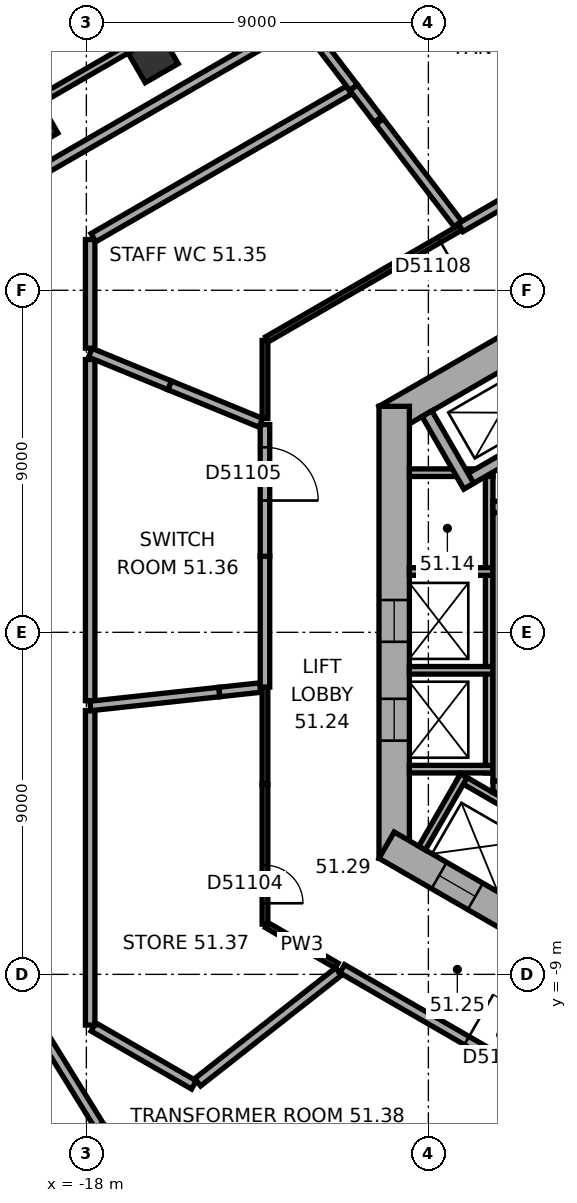
"""IFC4 building model, lengths in metres.
Left out: names, types, materials, properties, quantities, classifications, styles, units other than length and angle.
Written with IfcOpenShell. Run it as: python <this file> out.ifc"""

import sys

from ifc_helpers import new_model, si_unit, direction, frame, frame_2d, origin, origin_2d, place, context, subcontext, project, spatial, rectangle, extrude, element, fill, save


model = new_model("IFC4")
c1 = context("Model", 3, precision=1e-05, world=origin(), true_north=direction((0.0, 1.0)))
c2 = subcontext(c1, "Body", "Model", "MODEL_VIEW")
j1 = project(units=[si_unit("LENGTHUNIT", "METRE"), si_unit("PLANEANGLEUNIT", "RADIAN")], contexts=[c1])
p1 = place(None, origin())
s1 = spatial("IfcSite", under=j1, at=p1, CompositionType="ELEMENT")
p2 = place(p1, origin())
s2 = spatial("IfcBuilding", under=s1, at=p2, CompositionType="ELEMENT")
p3 = place(p2, frame((0.0, 0.0, 205.8)))
s3 = spatial("IfcBuildingStorey", under=s2, at=p3, CompositionType="ELEMENT", Elevation=205.8)
p4 = place(p3, frame((-16.242, 15.102, 0.0), z_axis=(0.0, 0.0, 1.0), x_axis=(-0.866025403784, -0.5, 0.0)))
e1 = element("IfcColumn", 1, at=p4, inside=s3, PredefinedType="COLUMN", context=c2, shape_type="SweptSolid", body=[
    extrude(rectangle(XDim=1.0, YDim=0.9, at=origin_2d()), origin(), (0.0, 0.0, 1.0), 4.8),
])
p5 = place(p3, frame((-19.494, 13.225, 0.0), z_axis=(0.0, 0.0, 1.0), x_axis=(-0.866025403784, -0.5, 0.0)))
e2 = element("IfcColumn", 2, at=p5, inside=s3, PredefinedType="COLUMN", context=c2, shape_type="SweptSolid", body=[
    extrude(rectangle(XDim=1.2, YDim=0.9, at=origin_2d()), origin(), (0.0, 0.0, 1.0), 4.8),
])
p6 = place(p3, frame((0.2, 11.547, 0.0), z_axis=(0.0, 0.0, 1.0), x_axis=(-0.866023897231, -0.500002609418, 0.0)))
e3 = element("IfcWall", 3, at=p6, inside=s3, PredefinedType="SHEAR", context=c2, shape_type="SweptSolid", body=[
    extrude(rectangle(XDim=11.894, YDim=0.8, at=frame_2d((5.947, 0.0))), origin(), (0.0, 0.0, 1.0), 4.8),
])
p7 = place(p6, frame((6.147, 0.0, 0.0)))
e4 = element("IfcOpeningElement", 4, at=p7, cuts=e3, PredefinedType="OPENING", context=c2, shape_type="SweptSolid", body=[
    extrude(rectangle(XDim=1.5, YDim=2.1, at=frame_2d((0.75, 1.05))), frame((0.0, 0.41, 0.0), z_axis=(0.0, -1.0, 0.0), x_axis=(1.0, 0.0, 0.0)), (0.0, 0.0, 1.0), 0.82),
])
p8 = place(p6, frame((1.697, 0.0, 0.0)))
e5 = element("IfcOpeningElement", 5, at=p8, cuts=e3, PredefinedType="OPENING", context=c2, shape_type="SweptSolid", body=[
    extrude(rectangle(XDim=0.9, YDim=2.1, at=frame_2d((0.45, 1.05))), frame((0.0, 0.41, 0.0), z_axis=(0.0, -1.0, 0.0), x_axis=(1.0, 0.0, 0.0)), (0.0, 0.0, 1.0), 0.82),
])
p9 = place(p6, frame((4.297, 0.0, 0.0)))
e6 = element("IfcOpeningElement", 6, at=p9, cuts=e3, PredefinedType="OPENING", context=c2, shape_type="SweptSolid", body=[
    extrude(rectangle(XDim=0.9, YDim=2.1, at=frame_2d((0.45, 1.05))), frame((0.0, 0.41, 0.0), z_axis=(0.0, -1.0, 0.0), x_axis=(1.0, 0.0, 0.0)), (0.0, 0.0, 1.0), 0.82),
])
p10 = place(p3, frame((-9.9, 5.947, 0.0), z_axis=(0.0, 0.0, 1.0), x_axis=(0.0, -1.0, 0.0)))
e7 = element("IfcWall", 7, at=p10, inside=s3, PredefinedType="SHEAR", context=c2, shape_type="SweptSolid", body=[
    extrude(rectangle(XDim=11.894, YDim=0.8, at=frame_2d((5.947, 0.0))), origin(), (0.0, 0.0, 1.0), 4.8),
])
p11 = place(p10, frame((5.097, 0.0, 0.0)))
e8 = element("IfcOpeningElement", 8, at=p11, cuts=e7, PredefinedType="OPENING", context=c2, shape_type="SweptSolid", body=[
    extrude(rectangle(XDim=1.1, YDim=2.1, at=frame_2d((0.55, 1.05))), frame((0.0, 0.41, 0.0), z_axis=(0.0, -1.0, 0.0), x_axis=(1.0, 0.0, 0.0)), (0.0, 0.0, 1.0), 0.82),
])
p12 = place(p10, frame((7.697, 0.0, 0.0)))
e9 = element("IfcOpeningElement", 9, at=p12, cuts=e7, PredefinedType="OPENING", context=c2, shape_type="SweptSolid", body=[
    extrude(rectangle(XDim=1.1, YDim=2.1, at=frame_2d((0.55, 1.05))), frame((0.0, 0.41, 0.0), z_axis=(0.0, -1.0, 0.0), x_axis=(1.0, 0.0, 0.0)), (0.0, 0.0, 1.0), 0.82),
])
p13 = place(p3, frame((-10.1, -5.6, 0.0), z_axis=(0.0, 0.0, 1.0), x_axis=(0.866023897231, -0.500002609418, 0.0)))
e10 = element("IfcWall", 10, at=p13, inside=s3, PredefinedType="SHEAR", context=c2, shape_type="SweptSolid", body=[
    extrude(rectangle(XDim=11.894, YDim=0.8, at=frame_2d((5.947, 0.0))), origin(), (0.0, 0.0, 1.0), 4.8),
])
p14 = place(p13, frame((6.147, 0.0, 0.0)))
e11 = element("IfcOpeningElement", 11, at=p14, cuts=e10, PredefinedType="OPENING", context=c2, shape_type="SweptSolid", body=[
    extrude(rectangle(XDim=1.5, YDim=2.1, at=frame_2d((0.75, 1.05))), frame((0.0, 0.41, 0.0), z_axis=(0.0, -1.0, 0.0), x_axis=(1.0, 0.0, 0.0)), (0.0, 0.0, 1.0), 0.82),
])
p15 = place(p13, frame((1.597, 0.0, 0.0)))
e12 = element("IfcOpeningElement", 12, at=p15, cuts=e10, PredefinedType="OPENING", context=c2, shape_type="SweptSolid", body=[
    extrude(rectangle(XDim=1.1, YDim=2.1, at=frame_2d((0.55, 1.05))), frame((0.0, 0.41, 0.0), z_axis=(0.0, -1.0, 0.0), x_axis=(1.0, 0.0, 0.0)), (0.0, 0.0, 1.0), 0.82),
])
p16 = place(p13, frame((4.197, 0.0, 0.0)))
e13 = element("IfcOpeningElement", 13, at=p16, cuts=e10, PredefinedType="OPENING", context=c2, shape_type="SweptSolid", body=[
    extrude(rectangle(XDim=1.1, YDim=2.1, at=frame_2d((0.55, 1.05))), frame((0.0, 0.41, 0.0), z_axis=(0.0, -1.0, 0.0), x_axis=(1.0, 0.0, 0.0)), (0.0, 0.0, 1.0), 0.82),
])
p17 = place(p3, frame((-2.961, 23.405, 0.0), z_axis=(0.0, 0.0, 1.0), x_axis=(-0.866023315909, -0.500003616288, 0.0)))
e14 = element("IfcWall", 14, at=p17, inside=s3, PredefinedType="STANDARD", context=c2, shape_type="SweptSolid", body=[
    extrude(rectangle(XDim=20.044, YDim=0.2, at=frame_2d((10.022, 0.0))), origin(), (0.0, 0.0, 1.0), 4.8),
])
p18 = place(p3, frame((-21.137, -10.496, 0.0), z_axis=(0.0, 0.0, 1.0), x_axis=(0.526178661629, -0.850374044786, 0.0)))
e15 = element("IfcWall", 15, at=p18, inside=s3, PredefinedType="STANDARD", context=c2, shape_type="SweptSolid", body=[
    extrude(rectangle(XDim=4.395, YDim=0.2, at=frame_2d((2.197, 0.0))), origin(), (0.0, 0.0, 1.0), 4.8),
])
p19 = place(p3, frame((-7.4, 4.3, 0.0), z_axis=(0.0, 0.0, 1.0), x_axis=(0.0, -1.0, 0.0)))
e16 = element("IfcWall", 16, at=p19, inside=s3, PredefinedType="PARTITIONING", context=c2, shape_type="SweptSolid", body=[
    extrude(rectangle(XDim=8.0, YDim=0.2, at=frame_2d((4.0, 0.0))), origin(), (0.0, 0.0, 1.0), 4.52),
])
for number, where, z_axis, x_axis in (
    (17, (-7.3, 4.2, 0.0), (0.0, 0.0, 1.0), (-1.0, 0.0, 0.0)),
    (18, (-7.3, 1.6, 0.0), (0.0, 0.0, 1.0), (-1.0, 0.0, 0.0)),
    (19, (-7.3, -1.0, 0.0), (0.0, 0.0, 1.0), (-1.0, 0.0, 0.0)),
    (20, (-7.3, -3.6, 0.0), (0.0, 0.0, 1.0), (-1.0, 0.0, 0.0)),
):
    element("IfcWall", number, at=place(p3, frame(where, z_axis=z_axis, x_axis=x_axis)), inside=s3, PredefinedType="PARTITIONING", context=c2, shape_type="SweptSolid", body=[
        extrude(rectangle(XDim=2.2, YDim=0.2, at=frame_2d((1.1, 0.0))), origin(), (0.0, 0.0, 1.0), 4.52),
    ])
p20 = place(p3, frame((-8.203, -3.809, 0.0), z_axis=(0.0, 0.0, 1.0), x_axis=(0.866028230842, -0.499995103361, 0.0)))
e21 = element("IfcWall", 21, at=p20, inside=s3, PredefinedType="PARTITIONING", context=c2, shape_type="SweptSolid", body=[
    extrude(rectangle(XDim=5.4, YDim=0.2, at=frame_2d((2.7, 0.0))), origin(), (0.0, 0.0, 1.0), 4.52),
])
p21 = place(p3, frame((-8.067, -3.772, 0.0), z_axis=(0.0, 0.0, 1.0), x_axis=(-0.50002983664, -0.866008176907, 0.0)))
e22 = element("IfcWall", 22, at=p21, inside=s3, PredefinedType="PARTITIONING", context=c2, shape_type="SweptSolid", body=[
    extrude(rectangle(XDim=2.2, YDim=0.2, at=frame_2d((1.1, 0.0))), origin(), (0.0, 0.0, 1.0), 4.52),
])
p22 = place(p3, frame((-2.6, 3.3, 0.0), z_axis=(0.0, 0.0, 1.0), x_axis=(-1.0, 0.0, 0.0)))
e23 = element("IfcWall", 23, at=p22, inside=s3, PredefinedType="SHEAR", context=c2, shape_type="SweptSolid", body=[
    extrude(rectangle(XDim=4.7, YDim=0.3, at=frame_2d((2.35, 0.0))), origin(), (0.0, 0.0, 1.0), 4.52),
])
p23 = place(p22, frame((0.8, 0.0, 0.0)))
e24 = element("IfcOpeningElement", 24, at=p23, cuts=e23, PredefinedType="OPENING", context=c2, shape_type="SweptSolid", body=[
    extrude(rectangle(XDim=1.2, YDim=2.1, at=frame_2d((0.6, 1.05))), frame((0.0, 0.16, 0.0), z_axis=(0.0, -1.0, 0.0), x_axis=(1.0, 0.0, 0.0)), (0.0, 0.0, 1.0), 0.32),
])
p24 = place(p3, frame((-2.6, -4.06, 0.0), z_axis=(0.0, 0.0, 1.0), x_axis=(-1.0, 0.0, 0.0)))
e25 = element("IfcWall", 25, at=p24, inside=s3, PredefinedType="SHEAR", context=c2, shape_type="SweptSolid", body=[
    extrude(rectangle(XDim=4.7, YDim=0.3, at=frame_2d((2.35, 0.0))), origin(), (0.0, 0.0, 1.0), 4.52),
])
p25 = place(p3, frame((-7.15, 3.15, 0.0), z_axis=(0.0, 0.0, 1.0), x_axis=(0.0, -1.0, 0.0)))
e26 = element("IfcWall", 26, at=p25, inside=s3, PredefinedType="SHEAR", context=c2, shape_type="SweptSolid", body=[
    extrude(rectangle(XDim=7.06, YDim=0.3, at=frame_2d((3.53, 0.0))), origin(), (0.0, 0.0, 1.0), 4.52),
])
p26 = place(p3, frame((-5.24, 5.577, 0.0), z_axis=(0.0, 0.0, 1.0), x_axis=(-0.866014461049, -0.500018952895, 0.0)))
e27 = element("IfcWall", 27, at=p26, inside=s3, PredefinedType="SHEAR", context=c2, shape_type="SweptSolid", body=[
    extrude(rectangle(XDim=3.35, YDim=0.3, at=frame_2d((1.675, 0.0))), origin(), (0.0, 0.0, 1.0), 4.52),
])
p27 = place(p3, frame((-7.937, 3.847, 0.0), z_axis=(0.0, 0.0, 1.0), x_axis=(-0.50002983664, 0.866008176907, 0.0)))
e28 = element("IfcWall", 28, at=p27, inside=s3, PredefinedType="SHEAR", context=c2, shape_type="SweptSolid", body=[
    extrude(rectangle(XDim=2.2, YDim=0.3, at=frame_2d((1.1, 0.0))), origin(), (0.0, 0.0, 1.0), 4.52),
])
p28 = place(p3, frame((-17.664, -12.982, 0.0), z_axis=(0.0, 0.0, 1.0), x_axis=(-0.526157085046, 0.850387395165, 0.0)))
e29 = element("IfcWall", 29, at=p28, inside=s3, PredefinedType="SOLIDWALL", context=c2, shape_type="SweptSolid", body=[
    extrude(rectangle(XDim=3.489, YDim=0.25, at=frame_2d((1.745, 0.0))), origin(), (0.0, 0.0, 1.0), 4.52),
])
p29 = place(p3, frame((-5.203, -12.514, 0.0), z_axis=(0.0, 0.0, 1.0), x_axis=(-0.383964269763, -0.923347951503, 0.0)))
e30 = element("IfcWall", 30, at=p29, inside=s3, PredefinedType="SOLIDWALL", context=c2, shape_type="SweptSolid", body=[
    extrude(rectangle(XDim=6.577, YDim=0.25, at=frame_2d((3.289, 0.0))), origin(), (0.0, 0.0, 1.0), 3.6),
])
p30 = place(p3, frame((-15.17, -11.908, 0.0), z_axis=(0.0, 0.0, 1.0), x_axis=(-0.866356035716, 0.499426890925, 0.0)))
e31 = element("IfcWall", 31, at=p30, inside=s3, PredefinedType="SOLIDWALL", context=c2, shape_type="SweptSolid", body=[
    extrude(rectangle(XDim=3.051, YDim=0.25, at=frame_2d((1.526, 0.0))), origin(), (0.0, 0.0, 1.0), 4.52),
])
p31 = place(p3, frame((-17.9, -10.334, 0.0), z_axis=(0.0, 0.0, 1.0), x_axis=(0.0, 1.0, 0.0)))
e32 = element("IfcWall", 32, at=p31, inside=s3, PredefinedType="SOLIDWALL", context=c2, shape_type="SweptSolid", body=[
    extrude(rectangle(XDim=8.276, YDim=0.25, at=frame_2d((4.138, 0.0))), origin(), (0.0, 0.0, 1.0), 4.52),
])
p32 = place(p3, frame((-11.363, -8.926, 0.0), z_axis=(0.0, 0.0, 1.0), x_axis=(-0.786388390319, -0.617732385075, 0.0)))
e33 = element("IfcWall", 33, at=p32, inside=s3, PredefinedType="SOLIDWALL", context=c2, shape_type="SweptSolid", body=[
    extrude(rectangle(XDim=4.716, YDim=0.25, at=frame_2d((2.358, 0.0))), origin(), (0.0, 0.0, 1.0), 3.6),
])
p33 = place(p3, frame((-11.269, -8.852, 0.0), z_axis=(0.0, 0.0, 1.0), x_axis=(0.866019457076, -0.500010299859, 0.0)))
e34 = element("IfcWall", 34, at=p33, inside=s3, PredefinedType="SOLIDWALL", context=c2, shape_type="SweptSolid", body=[
    extrude(rectangle(XDim=5.433, YDim=0.25, at=frame_2d((2.717, 0.0))), origin(), (0.0, 0.0, 1.0), 4.52),
])
p34 = place(p33, frame((3.783, 0.0, 0.0)))
e35 = element("IfcOpeningElement", 35, at=p34, cuts=e34, PredefinedType="OPENING", context=c2, shape_type="SweptSolid", body=[
    extrude(rectangle(XDim=1.4, YDim=2.1, at=frame_2d((0.7, 1.05))), frame((0.0, 0.135, 0.0), z_axis=(0.0, -1.0, 0.0), x_axis=(1.0, 0.0, 0.0)), (0.0, 0.0, 1.0), 0.27),
])
p35 = place(p3, frame((-13.248, -7.709, 0.0), z_axis=(0.0, 0.0, 1.0), x_axis=(0.866093487018, -0.499882057835, 0.0)))
e36 = element("IfcWall", 36, at=p35, inside=s3, PredefinedType="PARTITIONING", context=c2, shape_type="SweptSolid", body=[
    extrude(rectangle(XDim=2.119, YDim=0.15, at=frame_2d((1.059, 0.0))), origin(), (0.0, 0.0, 1.0), 4.52),
])
p36 = place(p3, frame((-13.3, -7.679, 0.0), z_axis=(0.0, 0.0, 1.0), x_axis=(0.0, 1.0, 0.0)))
e37 = element("IfcWall", 37, at=p36, inside=s3, PredefinedType="PARTITIONING", context=c2, shape_type="SweptSolid", body=[
    extrude(rectangle(XDim=3.679, YDim=0.15, at=frame_2d((1.839, 0.0))), origin(), (0.0, 0.0, 1.0), 4.52),
])
p37 = place(p36, frame((0.55, 0.0, 0.0)))
e38 = element("IfcOpeningElement", 38, at=p37, cuts=e37, PredefinedType="OPENING", context=c2, shape_type="SweptSolid", body=[
    extrude(rectangle(XDim=1.0, YDim=2.1, at=frame_2d((0.5, 1.05))), frame((0.0, 0.085, 0.0), z_axis=(0.0, -1.0, 0.0), x_axis=(1.0, 0.0, 0.0)), (0.0, 0.0, 1.0), 0.17),
])
p38 = place(p3, frame((-13.3, -4.0, 0.0), z_axis=(0.0, 0.0, 1.0), x_axis=(0.0, 1.0, 0.0)))
e39 = element("IfcWall", 39, at=p38, inside=s3, PredefinedType="PARTITIONING", context=c2, shape_type="SweptSolid", body=[
    extrude(rectangle(XDim=2.56, YDim=0.15, at=frame_2d((1.28, 0.0))), origin(), (0.0, 0.0, 1.0), 4.52),
])
p39 = place(p3, frame((-17.9, -1.799, 0.0), z_axis=(0.0, 0.0, 1.0), x_axis=(0.0, 1.0, 0.0)))
e40 = element("IfcWall", 40, at=p39, inside=s3, PredefinedType="SOLIDWALL", context=c2, shape_type="SweptSolid", body=[
    extrude(rectangle(XDim=8.977, YDim=0.25, at=frame_2d((4.488, 0.0))), origin(), (0.0, 0.0, 1.0), 4.52),
])
p40 = place(p3, frame((-14.501, -1.571, 0.0), z_axis=(0.0, 0.0, 1.0), x_axis=(-0.994191133152, -0.10762894946, 0.0)))
e41 = element("IfcWall", 41, at=p40, inside=s3, PredefinedType="SOLIDWALL", context=c2, shape_type="SweptSolid", body=[
    extrude(rectangle(XDim=3.414, YDim=0.25, at=frame_2d((1.707, 0.0))), origin(), (0.0, 0.0, 1.0), 3.6),
])
p41 = place(p3, frame((-14.501, -1.571, 0.0), z_axis=(0.0, 0.0, 1.0), x_axis=(0.994183696144, 0.107697624498, 0.0)))
e42 = element("IfcWall", 42, at=p41, inside=s3, PredefinedType="SOLIDWALL", context=c2, shape_type="SweptSolid", body=[
    extrude(rectangle(XDim=1.088, YDim=0.25, at=frame_2d((0.544, 0.0))), origin(), (0.0, 0.0, 1.0), 3.6),
])
p42 = place(p3, frame((-13.3, -1.44, 0.0), z_axis=(0.0, 0.0, 1.0), x_axis=(0.0, 1.0, 0.0)))
e43 = element("IfcWall", 43, at=p42, inside=s3, PredefinedType="SOLIDWALL", context=c2, shape_type="SweptSolid", body=[
    extrude(rectangle(XDim=3.44, YDim=0.25, at=frame_2d((1.72, 0.0))), origin(), (0.0, 0.0, 1.0), 4.52),
])
p43 = place(p3, frame((-13.3, 2.0, 0.0), z_axis=(0.0, 0.0, 1.0), x_axis=(0.0, 1.0, 0.0)))
e44 = element("IfcWall", 44, at=p43, inside=s3, PredefinedType="SOLIDWALL", context=c2, shape_type="SweptSolid", body=[
    extrude(rectangle(XDim=3.468, YDim=0.25, at=frame_2d((1.734, 0.0))), origin(), (0.0, 0.0, 1.0), 4.52),
])
p44 = place(p43, frame((1.468, 0.0, 0.0)))
e45 = element("IfcOpeningElement", 45, at=p44, cuts=e44, PredefinedType="OPENING", context=c2, shape_type="SweptSolid", body=[
    extrude(rectangle(XDim=1.4, YDim=2.1, at=frame_2d((0.7, 1.05))), frame((0.0, 0.135, 0.0), z_axis=(0.0, -1.0, 0.0), x_axis=(1.0, 0.0, 0.0)), (0.0, 0.0, 1.0), 0.27),
])
p45 = place(p3, frame((-13.3, 5.627, 0.0), z_axis=(0.0, 0.0, 1.0), x_axis=(0.0, 1.0, 0.0)))
e46 = element("IfcWall", 46, at=p45, inside=s3, PredefinedType="PARTITIONING", context=c2, shape_type="SweptSolid", body=[
    extrude(rectangle(XDim=2.052, YDim=0.15, at=frame_2d((1.026, 0.0))), origin(), (0.0, 0.0, 1.0), 4.52),
])
p46 = place(p3, frame((-15.809, 6.499, 0.0), z_axis=(0.0, 0.0, 1.0), x_axis=(0.924968398932, -0.380044025052, 0.0)))
e47 = element("IfcWall", 47, at=p46, inside=s3, PredefinedType="SOLIDWALL", context=c2, shape_type="SweptSolid", body=[
    extrude(rectangle(XDim=2.593, YDim=0.25, at=frame_2d((1.296, 0.0))), origin(), (0.0, 0.0, 1.0), 3.6),
])
p47 = place(p3, frame((-17.895, 7.356, 0.0), z_axis=(0.0, 0.0, 1.0), x_axis=(0.924911084765, -0.380183488962, 0.0)))
e48 = element("IfcWall", 48, at=p47, inside=s3, PredefinedType="SOLIDWALL", context=c2, shape_type="SweptSolid", body=[
    extrude(rectangle(XDim=2.255, YDim=0.25, at=frame_2d((1.128, 0.0))), origin(), (0.0, 0.0, 1.0), 3.6),
])
p48 = place(p3, frame((-17.9, 7.476, 0.0), z_axis=(0.0, 0.0, 1.0), x_axis=(0.0, 1.0, 0.0)))
e49 = element("IfcWall", 49, at=p48, inside=s3, PredefinedType="SOLIDWALL", context=c2, shape_type="SweptSolid", body=[
    extrude(rectangle(XDim=2.859, YDim=0.25, at=frame_2d((1.429, 0.0))), origin(), (0.0, 0.0, 1.0), 4.52),
])
p49 = place(p3, frame((-17.813, 10.385, 0.0), z_axis=(0.0, 0.0, 1.0), x_axis=(0.866039997762, 0.499974721637, 0.0)))
e50 = element("IfcWall", 50, at=p49, inside=s3, PredefinedType="SOLIDWALL", context=c2, shape_type="SweptSolid", body=[
    extrude(rectangle(XDim=7.763, YDim=0.25, at=frame_2d((3.882, 0.0))), origin(), (0.0, 0.0, 1.0), 4.52),
])
p50 = place(p3, frame((-8.15, 10.652, 0.0), z_axis=(0.0, 0.0, 1.0), x_axis=(-0.866047461757, -0.499961792524, 0.0)))
e51 = element("IfcWall", 51, at=p50, inside=s3, PredefinedType="PARTITIONING", context=c2, shape_type="SweptSolid", body=[
    extrude(rectangle(XDim=5.887, YDim=0.15, at=frame_2d((2.943, 0.0))), origin(), (0.0, 0.0, 1.0), 4.52),
])
p51 = place(p50, frame((0.65, 0.0, 0.0)))
e52 = element("IfcOpeningElement", 52, at=p51, cuts=e51, PredefinedType="OPENING", context=c2, shape_type="SweptSolid", body=[
    extrude(rectangle(XDim=1.0, YDim=2.1, at=frame_2d((0.5, 1.05))), frame((0.0, 0.085, 0.0), z_axis=(0.0, -1.0, 0.0), x_axis=(1.0, 0.0, 0.0)), (0.0, 0.0, 1.0), 0.17),
])
p52 = place(p3, frame((-8.15, 10.652, 0.0), z_axis=(0.0, 0.0, 1.0), x_axis=(0.866033669941, 0.499985682323, 0.0)))
e53 = element("IfcWall", 53, at=p52, inside=s3, PredefinedType="SOLIDWALL", context=c2, shape_type="SweptSolid", body=[
    extrude(rectangle(XDim=7.065, YDim=0.25, at=frame_2d((3.533, 0.0))), origin(), (0.0, 0.0, 1.0), 4.52),
])
p53 = place(p52, frame((5.415, 0.0, 0.0)))
e54 = element("IfcOpeningElement", 54, at=p53, cuts=e53, PredefinedType="OPENING", context=c2, shape_type="SweptSolid", body=[
    extrude(rectangle(XDim=1.4, YDim=2.1, at=frame_2d((0.7, 1.05))), frame((0.0, 0.135, 0.0), z_axis=(0.0, -1.0, 0.0), x_axis=(1.0, 0.0, 0.0)), (0.0, 0.0, 1.0), 0.27),
])
p54 = place(p3, frame((-19.113, 12.181, 0.0), z_axis=(0.0, 0.0, 1.0), x_axis=(0.866048593798, 0.499959831567, 0.0)))
e55 = element("IfcWall", 55, at=p54, inside=s3, PredefinedType="SOLIDWALL", context=c2, shape_type="SweptSolid", body=[
    extrude(rectangle(XDim=7.835, YDim=0.25, at=frame_2d((3.917, 0.0))), origin(), (0.0, 0.0, 1.0), 4.02),
])
p55 = place(p3, frame((-10.283, 13.44, 0.0), z_axis=(0.0, 0.0, 1.0), x_axis=(0.607714696744, -0.794155430228, 0.0)))
e56 = element("IfcWall", 56, at=p55, inside=s3, PredefinedType="SOLIDWALL", context=c2, shape_type="SweptSolid", body=[
    extrude(rectangle(XDim=3.39, YDim=0.25, at=frame_2d((1.695, 0.0))), origin(), (0.0, 0.0, 1.0), 3.6),
])
p56 = place(p3, frame((-10.325, 13.494, 0.0), z_axis=(0.0, 0.0, 1.0), x_axis=(-0.607672305695, 0.794187867504, 0.0)))
e57 = element("IfcWall", 57, at=p56, inside=s3, PredefinedType="SOLIDWALL", context=c2, shape_type="SweptSolid", body=[
    extrude(rectangle(XDim=1.06, YDim=0.25, at=frame_2d((0.53, 0.0))), origin(), (0.0, 0.0, 1.0), 3.6),
])
p57 = place(p3, frame((-10.969, 14.336, 0.0), z_axis=(0.0, 0.0, 1.0), x_axis=(-0.607750843191, 0.794127768436, 0.0)))
e58 = element("IfcWall", 58, at=p57, inside=s3, PredefinedType="SOLIDWALL", context=c2, shape_type="SweptSolid", body=[
    extrude(rectangle(XDim=2.079, YDim=0.25, at=frame_2d((1.04, 0.0))), origin(), (0.0, 0.0, 1.0), 3.6),
])
p58 = place(p11, origin())
e59 = element("IfcDoor", 59, at=p58, inside=s3, OperationType="DOUBLE_DOOR_SLIDING", PredefinedType="DOOR", context=c2, shape_type="SweptSolid", body=[
    extrude(rectangle(XDim=1.1, YDim=2.1, at=frame_2d((0.55, 1.05))), frame((0.0, 0.025, 0.0), z_axis=(0.0, -1.0, 0.0), x_axis=(1.0, 0.0, 0.0)), (0.0, 0.0, 1.0), 0.05),
])
fill(e8, e59)
p59 = place(p12, origin())
e60 = element("IfcDoor", 60, at=p59, inside=s3, OperationType="DOUBLE_DOOR_SLIDING", PredefinedType="DOOR", context=c2, shape_type="SweptSolid", body=[
    extrude(rectangle(XDim=1.1, YDim=2.1, at=frame_2d((0.55, 1.05))), frame((0.0, 0.025, 0.0), z_axis=(0.0, -1.0, 0.0), x_axis=(1.0, 0.0, 0.0)), (0.0, 0.0, 1.0), 0.05),
])
fill(e9, e60)
p60 = place(p15, origin())
e61 = element("IfcDoor", 61, at=p60, inside=s3, OperationType="DOUBLE_DOOR_SLIDING", PredefinedType="DOOR", context=c2, shape_type="SweptSolid", body=[
    extrude(rectangle(XDim=1.1, YDim=2.1, at=frame_2d((0.55, 1.05))), frame((0.0, 0.025, 0.0), z_axis=(0.0, -1.0, 0.0), x_axis=(1.0, 0.0, 0.0)), (0.0, 0.0, 1.0), 0.05),
])
fill(e12, e61)
p61 = place(p34, origin())
e62 = element("IfcDoor", 62, at=p61, inside=s3, OperationType="SINGLE_SWING_LEFT", PredefinedType="DOOR", context=c2, shape_type="SweptSolid", body=[
    extrude(rectangle(XDim=1.4, YDim=2.1, at=frame_2d((0.7, 1.05))), frame((0.0, 0.025, 0.0), z_axis=(0.0, -1.0, 0.0), x_axis=(1.0, 0.0, 0.0)), (0.0, 0.0, 1.0), 0.05),
])
fill(e35, e62)
p62 = place(p37, origin())
e63 = element("IfcDoor", 63, at=p62, inside=s3, OperationType="SINGLE_SWING_LEFT", PredefinedType="DOOR", context=c2, shape_type="SweptSolid", body=[
    extrude(rectangle(XDim=1.0, YDim=2.1, at=frame_2d((0.5, 1.05))), frame((0.0, 0.025, 0.0), z_axis=(0.0, -1.0, 0.0), x_axis=(1.0, 0.0, 0.0)), (0.0, 0.0, 1.0), 0.05),
])
fill(e38, e63)
p63 = place(p44, origin())
e64 = element("IfcDoor", 64, at=p63, inside=s3, OperationType="SINGLE_SWING_LEFT", PredefinedType="DOOR", context=c2, shape_type="SweptSolid", body=[
    extrude(rectangle(XDim=1.4, YDim=2.1, at=frame_2d((0.7, 1.05))), frame((0.0, 0.025, 0.0), z_axis=(0.0, -1.0, 0.0), x_axis=(1.0, 0.0, 0.0)), (0.0, 0.0, 1.0), 0.05),
])
fill(e45, e64)
p64 = place(p51, origin())
e65 = element("IfcDoor", 65, at=p64, inside=s3, OperationType="SINGLE_SWING_LEFT", PredefinedType="DOOR", context=c2, shape_type="SweptSolid", body=[
    extrude(rectangle(XDim=1.0, YDim=2.1, at=frame_2d((0.5, 1.05))), frame((0.0, 0.025, 0.0), z_axis=(0.0, -1.0, 0.0), x_axis=(1.0, 0.0, 0.0)), (0.0, 0.0, 1.0), 0.05),
])
fill(e52, e65)
save(model, sys.argv[1])
